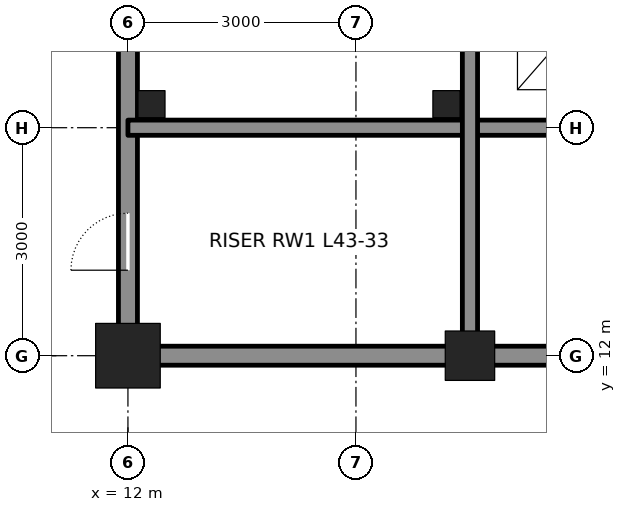
"""IFC4 building model, lengths in metres.
Left out: names, types, materials, properties, quantities, classifications, styles, units other than length and angle.
Written with IfcOpenShell. Run it as: python <this file> out.ifc"""

import sys

from ifc_helpers import new_model, si_unit, direction, frame, frame_2d, origin, origin_2d, place, context, subcontext, project, spatial, rectangle, hollow_rectangle, extrude, element, fill, save


model = new_model("IFC4")
c1 = context("Model", 3, precision=1e-05, world=origin(), true_north=direction((0.0, 1.0)))
c2 = subcontext(c1, "Body", "Model", "MODEL_VIEW")
j1 = project(units=[si_unit("LENGTHUNIT", "METRE"), si_unit("PLANEANGLEUNIT", "RADIAN")], contexts=[c1])
p1 = place(None, origin())
s1 = spatial("IfcSite", under=j1, at=p1, CompositionType="ELEMENT")
p2 = place(p1, origin())
s2 = spatial("IfcBuilding", under=s1, at=p2, CompositionType="ELEMENT")
p3 = place(p2, frame((0.0, 0.0, 197.1)))
s3 = spatial("IfcBuildingStorey", under=s2, at=p3, CompositionType="ELEMENT", Elevation=197.1)
p4 = place(p3, frame((12.0, 12.0, 0.0), z_axis=(0.0, 0.0, 1.0), x_axis=(1.0, 0.0, 0.0)))
e1 = element("IfcColumn", 1, at=p4, inside=s3, PredefinedType="COLUMN", context=c2, shape_type="SweptSolid", body=[
    extrude(hollow_rectangle(XDim=0.85, YDim=0.85, WallThickness=0.085, at=origin_2d()), origin(), (0.0, 0.0, 1.0), 4.2),
])
p5 = place(p3, frame((16.5, 12.0, 0.0), z_axis=(0.0, 0.0, 1.0), x_axis=(1.0, 0.0, 0.0)))
e2 = element("IfcColumn", 2, at=p5, inside=s3, PredefinedType="COLUMN", context=c2, shape_type="SweptSolid", body=[
    extrude(hollow_rectangle(XDim=0.65, YDim=0.65, WallThickness=0.065, at=origin_2d()), origin(), (0.0, 0.0, 1.0), 4.2),
])
p6 = place(p3, frame((12.0, 12.25, 0.0), z_axis=(0.0, 0.0, 1.0), x_axis=(0.0, 1.0, 0.0)))
e3 = element("IfcWall", 3, at=p6, inside=s3, PredefinedType="SOLIDWALL", context=c2, shape_type="SweptSolid", body=[
    extrude(rectangle(XDim=8.5, YDim=0.25, at=frame_2d((4.25, 0.0))), origin(), (0.0, 0.0, 1.0), 3.113),
])
p7 = place(p6, frame((0.875, 0.0, 0.0)))
e4 = element("IfcOpeningElement", 4, at=p7, cuts=e3, PredefinedType="OPENING", context=c2, shape_type="SweptSolid", body=[
    extrude(rectangle(XDim=0.75, YDim=2.1, at=frame_2d((0.375, 1.05))), frame((0.0, 0.135, 0.0), z_axis=(0.0, -1.0, 0.0), x_axis=(1.0, 0.0, 0.0)), (0.0, 0.0, 1.0), 0.27),
])
p8 = place(p3, frame((12.25, 12.0, 0.0), z_axis=(0.0, 0.0, 1.0), x_axis=(1.0, 0.0, 0.0)))
e5 = element("IfcWall", 5, at=p8, inside=s3, PredefinedType="SOLIDWALL", context=c2, shape_type="SweptSolid", body=[
    extrude(rectangle(XDim=4.0, YDim=0.25, at=frame_2d((2.0, 0.0))), origin(), (0.0, 0.0, 1.0), 3.181),
])
p9 = place(p3, frame((16.75, 12.0, 0.0), z_axis=(0.0, 0.0, 1.0), x_axis=(1.0, 0.0, 0.0)))
e6 = element("IfcWall", 6, at=p9, inside=s3, PredefinedType="SOLIDWALL", context=c2, shape_type="SweptSolid", body=[
    extrude(rectangle(XDim=2.5, YDim=0.25, at=frame_2d((1.25, 0.0))), origin(), (0.0, 0.0, 1.0), 3.181),
])
p10 = place(p3, frame((12.0, 15.0, 0.0), z_axis=(0.0, 0.0, 1.0), x_axis=(1.0, 0.0, 0.0)))
e7 = element("IfcWall", 7, at=p10, inside=s3, PredefinedType="SOLIDWALL", context=c2, shape_type="SweptSolid", body=[
    extrude(rectangle(XDim=7.5, YDim=0.2, at=frame_2d((3.75, 0.0))), origin(), (0.0, 0.0, 1.0), 4.04),
])
p11 = place(p3, frame((16.5, 12.25, 0.0), z_axis=(0.0, 0.0, 1.0), x_axis=(0.0, 1.0, 0.0)))
e8 = element("IfcWall", 8, at=p11, inside=s3, PredefinedType="SOLIDWALL", context=c2, shape_type="SweptSolid", body=[
    extrude(rectangle(XDim=8.5, YDim=0.2, at=frame_2d((4.25, 0.0))), origin(), (0.0, 0.0, 1.0), 3.113),
])
for number, where, z_axis, x_axis in (
    (9, (12.31, 15.31, 0.0), (0.0, 0.0, 1.0), (1.0, 0.0, 0.0)),
    (10, (16.19, 15.31, 0.0), (0.0, 0.0, 1.0), (1.0, 0.0, 0.0)),
):
    element("IfcColumn", number, at=place(p3, frame(where, z_axis=z_axis, x_axis=x_axis)), inside=s3, PredefinedType="COLUMN", context=c2, shape_type="SweptSolid", body=[
        extrude(hollow_rectangle(XDim=0.356, YDim=0.356, WallThickness=0.015, at=origin_2d()), origin(), (0.0, 0.0, 1.0), 4.2),
    ])
p12 = place(p7, origin())
e11 = element("IfcDoor", 11, at=p12, inside=s3, OperationType="SINGLE_SWING_LEFT", PredefinedType="DOOR", context=c2, shape_type="SweptSolid", body=[
    extrude(rectangle(XDim=0.75, YDim=2.1, at=frame_2d((0.375, 1.05))), frame((0.0, 0.025, 0.0), z_axis=(0.0, -1.0, 0.0), x_axis=(1.0, 0.0, 0.0)), (0.0, 0.0, 1.0), 0.05),
])
fill(e4, e11)
save(model, sys.argv[1])
